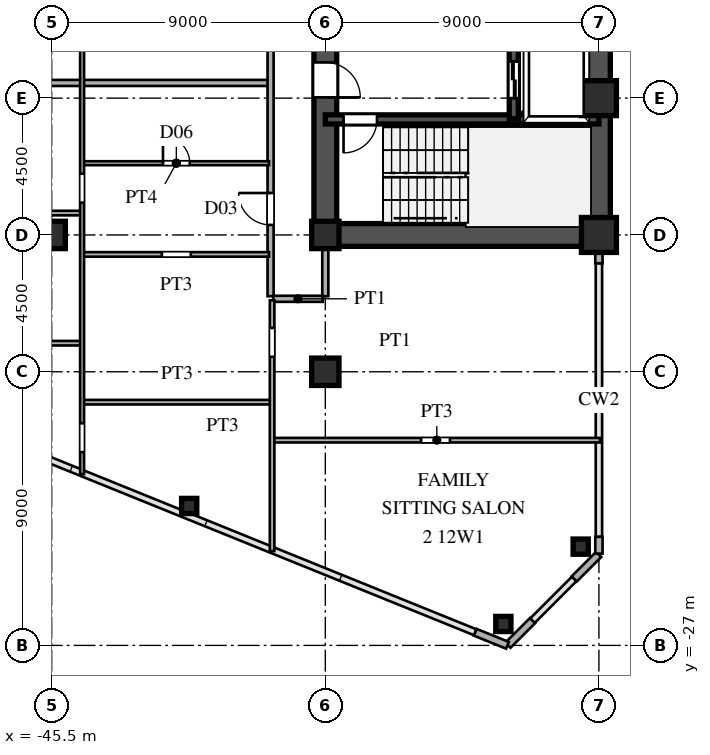
"""IFC4 building model, lengths in metres.
Left out: names, types, materials, properties, quantities, classifications, styles, units other than length and angle.
Written with IfcOpenShell. Run it as: python <this file> out.ifc"""

import sys

from ifc_helpers import new_model, si_unit, direction, frame, frame_2d, origin, origin_2d, place, context, subcontext, project, spatial, rectangle, hollow_rectangle, i_section, extrude, source, transform, mapped, element, fill, save


model = new_model("IFC4")
c1 = context("Model", 3, precision=1e-05, world=origin(), true_north=direction((0.0, 1.0)))
c2 = subcontext(c1, "Body", "Model", "MODEL_VIEW")
j1 = project(units=[si_unit("LENGTHUNIT", "METRE"), si_unit("PLANEANGLEUNIT", "RADIAN")], contexts=[c1])
p1 = place(None, origin())
s1 = spatial("IfcSite", under=j1, at=p1, CompositionType="ELEMENT")
p2 = place(p1, origin())
s2 = spatial("IfcBuilding", under=s1, at=p2, CompositionType="ELEMENT")
p3 = place(p2, frame((0.0, 0.0, 47.7)))
s3 = spatial("IfcBuildingStorey", under=s2, at=p3, CompositionType="ELEMENT", Elevation=47.7)
m1 = source(origin(), c2, "Body", "SweptSolid", [
    extrude(hollow_rectangle(XDim=1.15, YDim=1.15, WallThickness=0.048, at=origin_2d()), origin(), (0.0, 0.0, 1.0), 3.6),
])
for number, where, z_axis, x_axis in (
    (1, (-27.5, -13.5, 0.0), (0.0, 0.0, 1.0), (1.0, 0.0, 0.0)),
    (2, (-27.5, -9.0, 0.0), (0.0, 0.0, 1.0), (1.0, 0.0, 0.0)),
):
    element("IfcColumn", number, at=place(p3, frame(where, z_axis=z_axis, x_axis=x_axis)), inside=s3, PredefinedType="COLUMN", context=c2, shape_type="MappedRepresentation", body=[
        mapped(m1, transform((0.0, 0.0, 0.0), scale=1.0)),
    ])
m2 = source(origin(), c2, "Body", "SweptSolid", [
    extrude(i_section(OverallWidth=0.9, OverallDepth=0.9, WebThickness=0.036, FlangeThickness=0.055, at=origin_2d()), origin(), (0.0, 0.0, 1.0), 3.6),
])
for number, where, z_axis, x_axis in (
    (3, (-36.5, -18.0, 0.0), (0.0, 0.0, 1.0), (1.0, 0.0, 0.0)),
    (4, (-36.5, -13.5, 0.0), (0.0, 0.0, 1.0), (1.0, 0.0, 0.0)),
    (5, (-45.5, -13.5, 0.0), (0.0, 0.0, 1.0), (1.0, 0.0, 0.0)),
):
    element("IfcColumn", number, at=place(p3, frame(where, z_axis=z_axis, x_axis=x_axis)), inside=s3, PredefinedType="COLUMN", context=c2, shape_type="MappedRepresentation", body=[
        mapped(m2, transform((0.0, 0.0, 0.0), scale=1.0)),
    ])
m3 = source(origin(), c2, "Body", "SweptSolid", [
    extrude(hollow_rectangle(XDim=0.5, YDim=0.5, WallThickness=0.02, at=origin_2d()), origin(), (0.0, 0.0, 1.0), 3.6),
])
for number, where, z_axis, x_axis in (
    (6, (-28.1, -23.751, 0.0), (0.0, 0.0, 1.0), (1.0, 0.0, 0.0)),
    (7, (-30.643, -26.295, 0.0), (0.0, 0.0, 1.0), (1.0, 0.0, 0.0)),
    (8, (-40.977, -22.414, 0.0), (0.0, 0.0, 1.0), (1.0, 0.0, 0.0)),
):
    element("IfcColumn", number, at=place(p3, frame(where, z_axis=z_axis, x_axis=x_axis)), inside=s3, PredefinedType="COLUMN", context=c2, shape_type="MappedRepresentation", body=[
        mapped(m3, transform((0.0, 0.0, 0.0), scale=1.0)),
    ])
p4 = place(p3, frame((-27.5, -23.98, 0.0), z_axis=(0.0, 0.0, 1.0), x_axis=(0.0, 1.0, 0.0)))
e9 = element("IfcWall", 9, at=p4, inside=s3, PredefinedType="SOLIDWALL", context=c2, shape_type="SweptSolid", body=[
    extrude(rectangle(XDim=0.55, YDim=0.24, at=frame_2d((0.275, 0.0))), origin(), (0.0, 0.0, 1.0), 3.38),
])
p5 = place(p3, frame((-27.5, -14.43, 0.0), z_axis=(0.0, 0.0, 1.0), x_axis=(0.0, 1.0, 0.0)))
e10 = element("IfcWall", 10, at=p5, inside=s3, PredefinedType="SOLIDWALL", context=c2, shape_type="SweptSolid", body=[
    extrude(rectangle(XDim=0.55, YDim=0.24, at=frame_2d((0.275, 0.0))), origin(), (0.0, 0.0, 1.0), 2.88),
])
p6 = place(p3, frame((-31.566, -26.569, 0.0), z_axis=(0.0, 0.0, 1.0), x_axis=(0.927007103665, -0.375043770452, 0.0)))
e11 = element("IfcWall", 11, at=p6, inside=s3, PredefinedType="SOLIDWALL", context=c2, shape_type="SweptSolid", body=[
    extrude(rectangle(XDim=1.14, YDim=0.24, at=frame_2d((0.57, 0.0))), origin(), (0.0, 0.0, 1.0), 3.38),
])
for number, where, z_axis, x_axis in (
    (12, (-30.493, -26.993, 0.0), (0.0, 0.0, 1.0), (0.707, 0.707, 0.0)),
    (13, (-28.313, -24.813, 0.0), (0.0, 0.0, 1.0), (0.707, 0.707, 0.0)),
):
    element("IfcWall", number, at=place(p3, frame(where, z_axis=z_axis, x_axis=x_axis)), inside=s3, PredefinedType="SOLIDWALL", context=c2, shape_type="SweptSolid", body=[
        extrude(rectangle(XDim=1.14, YDim=0.24, at=frame_2d((0.57, 0.0))), origin(), (0.0, 0.0, 1.0), 3.38),
    ])
p7 = place(p3, frame((-27.5, -13.5, 0.0), z_axis=(0.0, 0.0, 1.0), x_axis=(0.0, 1.0, 0.0)))
e14 = element("IfcWall", 14, at=p7, inside=s3, PredefinedType="SHEAR", context=c2, shape_type="SweptSolid", body=[
    extrude(rectangle(XDim=12.2, YDim=0.75, at=frame_2d((6.1, 0.0))), origin(), (0.0, 0.0, 1.0), 3.38),
])
p8 = place(p3, frame((-36.5, -13.5, 0.0), z_axis=(0.0, 0.0, 1.0), x_axis=(1.0, 0.0, 0.0)))
e15 = element("IfcWall", 15, at=p8, inside=s3, PredefinedType="SHEAR", context=c2, shape_type="SweptSolid", body=[
    extrude(rectangle(XDim=9.0, YDim=0.75, at=frame_2d((4.5, 0.0))), origin(), (0.0, 0.0, 1.0), 3.38),
])
p9 = place(p3, frame((-36.5, -13.65, 0.0), z_axis=(0.0, 0.0, 1.0), x_axis=(0.0, 1.0, 0.0)))
e16 = element("IfcWall", 16, at=p9, inside=s3, PredefinedType="SHEAR", context=c2, shape_type="SweptSolid", body=[
    extrude(rectangle(XDim=7.15, YDim=0.75, at=frame_2d((3.575, 0.0))), origin(), (0.0, 0.0, 1.0), 3.38),
])
p10 = place(p9, frame((4.675, 0.0, 0.0)))
e17 = element("IfcOpeningElement", 17, at=p10, cuts=e16, PredefinedType="OPENING", context=c2, shape_type="SweptSolid", body=[
    extrude(rectangle(XDim=1.15, YDim=2.2, at=frame_2d((0.575, 1.1))), frame((0.0, 0.385, 0.0), z_axis=(0.0, -1.0, 0.0), x_axis=(1.0, 0.0, 0.0)), (0.0, 0.0, 1.0), 0.77),
])
p11 = place(p3, frame((-36.5, -9.7, 0.0), z_axis=(0.0, 0.0, 1.0), x_axis=(1.0, 0.0, 0.0)))
e18 = element("IfcWall", 18, at=p11, inside=s3, PredefinedType="SHEAR", context=c2, shape_type="SweptSolid", body=[
    extrude(rectangle(XDim=9.0, YDim=0.3, at=frame_2d((4.5, 0.0))), origin(), (0.0, 0.0, 1.0), 3.38),
])
p12 = place(p11, frame((0.6, 0.0, 0.0)))
e19 = element("IfcOpeningElement", 19, at=p12, cuts=e18, PredefinedType="OPENING", context=c2, shape_type="SweptSolid", body=[
    extrude(rectangle(XDim=1.1, YDim=2.2, at=frame_2d((0.55, 1.1))), frame((0.0, 0.16, 0.0), z_axis=(0.0, -1.0, 0.0), x_axis=(1.0, 0.0, 0.0)), (0.0, 0.0, 1.0), 0.32),
])
p13 = place(p3, frame((-30.3, -9.68, 0.0), z_axis=(0.0, 0.0, 1.0), x_axis=(0.0, 1.0, 0.0)))
e20 = element("IfcWall", 20, at=p13, inside=s3, PredefinedType="SHEAR", context=c2, shape_type="SweptSolid", body=[
    extrude(rectangle(XDim=2.56, YDim=0.3, at=frame_2d((1.28, 0.0))), origin(), (0.0, 0.0, 1.0), 3.38),
])
p14 = place(p13, frame((0.68, 0.0, 0.0)))
e21 = element("IfcOpeningElement", 21, at=p14, cuts=e20, PredefinedType="OPENING", context=c2, shape_type="SweptSolid", body=[
    extrude(rectangle(XDim=1.2, YDim=2.25, at=frame_2d((0.6, 1.125))), frame((0.0, 0.16, 0.0), z_axis=(0.0, -1.0, 0.0), x_axis=(1.0, 0.0, 0.0)), (0.0, 0.0, 1.0), 0.32),
])
p15 = place(p3, frame((-38.2, -20.25, 0.0), z_axis=(0.0, 0.0, 1.0), x_axis=(1.0, 0.0, 0.0)))
e22 = element("IfcWall", 22, at=p15, inside=s3, PredefinedType="PARTITIONING", context=c2, shape_type="SweptSolid", body=[
    extrude(rectangle(XDim=10.735, YDim=0.15, at=frame_2d((5.367, 0.0))), origin(), (0.0, 0.0, 1.0), 3.38),
])
p16 = place(p15, frame((4.85, 0.0, 0.0)))
e23 = element("IfcOpeningElement", 23, at=p16, cuts=e22, PredefinedType="OPENING", context=c2, shape_type="SweptSolid", body=[
    extrude(rectangle(XDim=0.95, YDim=2.15, at=frame_2d((0.475, 1.075))), frame((0.0, 0.085, 0.0), z_axis=(0.0, -1.0, 0.0), x_axis=(1.0, 0.0, 0.0)), (0.0, 0.0, 1.0), 0.17),
])
p17 = place(p3, frame((-44.45, -19.0, 0.0), z_axis=(0.0, 0.0, 1.0), x_axis=(1.0, 0.0, 0.0)))
e24 = element("IfcWall", 24, at=p17, inside=s3, PredefinedType="PARTITIONING", context=c2, shape_type="SweptSolid", body=[
    extrude(rectangle(XDim=6.15, YDim=0.15, at=frame_2d((3.075, 0.0))), origin(), (0.0, 0.0, 1.0), 3.38),
])
p18 = place(p3, frame((-54.45, -17.06, 0.0), z_axis=(0.0, 0.0, 1.0), x_axis=(1.0, 0.0, 0.0)))
e25 = element("IfcWall", 25, at=p18, inside=s3, PredefinedType="PARTITIONING", context=c2, shape_type="SweptSolid", body=[
    extrude(rectangle(XDim=9.9, YDim=0.15, at=frame_2d((4.95, 0.0))), origin(), (0.0, 0.0, 1.0), 3.38),
])
p19 = place(p18, frame((4.475, 0.0, 0.0)))
e26 = element("IfcOpeningElement", 26, at=p19, cuts=e25, PredefinedType="OPENING", context=c2, shape_type="SweptSolid", body=[
    extrude(rectangle(XDim=0.95, YDim=2.15, at=frame_2d((0.475, 1.075))), frame((0.0, 0.085, 0.0), z_axis=(0.0, -1.0, 0.0), x_axis=(1.0, 0.0, 0.0)), (0.0, 0.0, 1.0), 0.17),
])
p20 = place(p3, frame((-38.215, -15.6, 0.0), z_axis=(0.0, 0.0, 1.0), x_axis=(1.0, 0.0, 0.0)))
e27 = element("IfcWall", 27, at=p20, inside=s3, PredefinedType="PARTITIONING", context=c2, shape_type="SweptSolid", body=[
    extrude(rectangle(XDim=1.63, YDim=0.2, at=frame_2d((0.815, 0.0))), origin(), (0.0, 0.0, 1.0), 3.38),
])
p21 = place(p3, frame((-44.45, -14.14, 0.0), z_axis=(0.0, 0.0, 1.0), x_axis=(1.0, 0.0, 0.0)))
e28 = element("IfcWall", 28, at=p21, inside=s3, PredefinedType="PARTITIONING", context=c2, shape_type="SweptSolid", body=[
    extrude(rectangle(XDim=6.1, YDim=0.15, at=frame_2d((3.05, 0.0))), origin(), (0.0, 0.0, 1.0), 3.38),
])
p22 = place(p21, frame((2.575, 0.0, 0.0)))
e29 = element("IfcOpeningElement", 29, at=p22, cuts=e28, PredefinedType="OPENING", context=c2, shape_type="SweptSolid", body=[
    extrude(rectangle(XDim=0.95, YDim=2.15, at=frame_2d((0.475, 1.075))), frame((0.0, 0.085, 0.0), z_axis=(0.0, -1.0, 0.0), x_axis=(1.0, 0.0, 0.0)), (0.0, 0.0, 1.0), 0.17),
])
p23 = place(p3, frame((-65.672, -12.78, 0.0), z_axis=(0.0, 0.0, 1.0), x_axis=(1.0, 0.0, 0.0)))
e30 = element("IfcWall", 30, at=p23, inside=s3, PredefinedType="PARTITIONING", context=c2, shape_type="SweptSolid", body=[
    extrude(rectangle(XDim=21.122, YDim=0.15, at=frame_2d((10.561, 0.0))), origin(), (0.0, 0.0, 1.0), 3.38),
])
p24 = place(p23, frame((15.697, 0.0, 0.0)))
e31 = element("IfcOpeningElement", 31, at=p24, cuts=e30, PredefinedType="OPENING", context=c2, shape_type="SweptSolid", body=[
    extrude(rectangle(XDim=0.95, YDim=2.15, at=frame_2d((0.475, 1.075))), frame((0.0, 0.085, 0.0), z_axis=(0.0, -1.0, 0.0), x_axis=(1.0, 0.0, 0.0)), (0.0, 0.0, 1.0), 0.17),
])
p25 = place(p23, frame((7.847, 0.0, 0.0)))
e32 = element("IfcOpeningElement", 32, at=p25, cuts=e30, PredefinedType="OPENING", context=c2, shape_type="SweptSolid", body=[
    extrude(rectangle(XDim=0.95, YDim=2.15, at=frame_2d((0.475, 1.075))), frame((0.0, 0.085, 0.0), z_axis=(0.0, -1.0, 0.0), x_axis=(1.0, 0.0, 0.0)), (0.0, 0.0, 1.0), 0.17),
])
p26 = place(p3, frame((-44.45, -11.14, 0.0), z_axis=(0.0, 0.0, 1.0), x_axis=(1.0, 0.0, 0.0)))
e33 = element("IfcWall", 33, at=p26, inside=s3, PredefinedType="PARTITIONING", context=c2, shape_type="SweptSolid", body=[
    extrude(rectangle(XDim=6.1, YDim=0.13, at=frame_2d((3.05, 0.0))), origin(), (0.0, 0.0, 1.0), 3.38),
])
p27 = place(p26, frame((2.61, 0.0, 0.0)))
e34 = element("IfcOpeningElement", 34, at=p27, cuts=e33, PredefinedType="OPENING", context=c2, shape_type="SweptSolid", body=[
    extrude(rectangle(XDim=0.88, YDim=2.1, at=frame_2d((0.44, 1.05))), frame((0.0, 0.075, 0.0), z_axis=(0.0, -1.0, 0.0), x_axis=(1.0, 0.0, 0.0)), (0.0, 0.0, 1.0), 0.15),
])
p28 = place(p3, frame((-72.505, -8.5, 0.0), z_axis=(0.0, 0.0, 1.0), x_axis=(1.0, 0.0, 0.0)))
e35 = element("IfcWall", 35, at=p28, inside=s3, PredefinedType="PARTITIONING", context=c2, shape_type="SweptSolid", body=[
    extrude(rectangle(XDim=34.125, YDim=0.2, at=frame_2d((17.062, 0.0))), origin(), (0.0, 0.0, 1.0), 3.38),
])
p29 = place(p3, frame((-44.5, -21.368, 0.0), z_axis=(0.0, 0.0, 1.0), x_axis=(0.0, 1.0, 0.0)))
e36 = element("IfcWall", 36, at=p29, inside=s3, PredefinedType="PARTITIONING", context=c2, shape_type="SweptSolid", body=[
    extrude(rectangle(XDim=22.151, YDim=0.13, at=frame_2d((11.075, 0.0))), origin(), (0.0, 0.0, 1.0), 3.38),
])
p30 = place(p29, frame((8.932, 0.0, 0.0)))
e37 = element("IfcOpeningElement", 37, at=p30, cuts=e36, PredefinedType="OPENING", context=c2, shape_type="SweptSolid", body=[
    extrude(rectangle(XDim=0.95, YDim=2.15, at=frame_2d((0.475, 1.075))), frame((0.0, 0.075, 0.0), z_axis=(0.0, -1.0, 0.0), x_axis=(1.0, 0.0, 0.0)), (0.0, 0.0, 1.0), 0.15),
])
p31 = place(p29, frame((0.724, 0.0, 0.0)))
e38 = element("IfcOpeningElement", 38, at=p31, cuts=e36, PredefinedType="OPENING", context=c2, shape_type="SweptSolid", body=[
    extrude(rectangle(XDim=0.95, YDim=2.15, at=frame_2d((0.475, 1.075))), frame((0.0, 0.075, 0.0), z_axis=(0.0, -1.0, 0.0), x_axis=(1.0, 0.0, 0.0)), (0.0, 0.0, 1.0), 0.15),
])
p32 = place(p29, frame((19.393, 0.0, 0.0)))
e39 = element("IfcOpeningElement", 39, at=p32, cuts=e36, PredefinedType="OPENING", context=c2, shape_type="SweptSolid", body=[
    extrude(rectangle(XDim=0.95, YDim=2.15, at=frame_2d((0.475, 1.075))), frame((0.0, 0.075, 0.0), z_axis=(0.0, -1.0, 0.0), x_axis=(1.0, 0.0, 0.0)), (0.0, 0.0, 1.0), 0.15),
])
p33 = place(p3, frame((-38.3, -15.515, 0.0), z_axis=(0.0, 0.0, 1.0), x_axis=(0.0, 1.0, 0.0)))
e40 = element("IfcWall", 40, at=p33, inside=s3, PredefinedType="PARTITIONING", context=c2, shape_type="SweptSolid", body=[
    extrude(rectangle(XDim=31.03, YDim=0.2, at=frame_2d((15.515, 0.0))), origin(), (0.0, 0.0, 1.0), 3.38),
])
p34 = place(p33, frame((2.345, 0.0, 0.0)))
e41 = element("IfcOpeningElement", 41, at=p34, cuts=e40, PredefinedType="OPENING", context=c2, shape_type="SweptSolid", body=[
    extrude(rectangle(XDim=1.05, YDim=2.25, at=frame_2d((0.525, 1.125))), frame((0.0, 0.11, 0.0), z_axis=(0.0, -1.0, 0.0), x_axis=(1.0, 0.0, 0.0)), (0.0, 0.0, 1.0), 0.22),
])
p35 = place(p33, frame((13.28, 0.0, 0.0)))
e42 = element("IfcOpeningElement", 42, at=p35, cuts=e40, PredefinedType="OPENING", context=c2, shape_type="SweptSolid", body=[
    extrude(rectangle(XDim=1.05, YDim=2.25, at=frame_2d((0.525, 1.125))), frame((0.0, 0.11, 0.0), z_axis=(0.0, -1.0, 0.0), x_axis=(1.0, 0.0, 0.0)), (0.0, 0.0, 1.0), 0.22),
])
p36 = place(p33, frame((25.567, 0.0, 0.0)))
e43 = element("IfcOpeningElement", 43, at=p36, cuts=e40, PredefinedType="OPENING", context=c2, shape_type="SweptSolid", body=[
    extrude(rectangle(XDim=1.05, YDim=2.25, at=frame_2d((0.525, 1.125))), frame((0.0, 0.11, 0.0), z_axis=(0.0, -1.0, 0.0), x_axis=(1.0, 0.0, 0.0)), (0.0, 0.0, 1.0), 0.22),
])
p37 = place(p3, frame((-38.25, -23.898, 0.0), z_axis=(0.0, 0.0, 1.0), x_axis=(0.0, 1.0, 0.0)))
e44 = element("IfcWall", 44, at=p37, inside=s3, PredefinedType="PARTITIONING", context=c2, shape_type="SweptSolid", body=[
    extrude(rectangle(XDim=8.248, YDim=0.15, at=frame_2d((4.124, 0.0))), origin(), (0.0, 0.0, 1.0), 3.38),
])
p38 = place(p37, frame((6.391, 0.0, 0.0)))
e45 = element("IfcOpeningElement", 45, at=p38, cuts=e44, PredefinedType="OPENING", context=c2, shape_type="SweptSolid", body=[
    extrude(rectangle(XDim=0.95, YDim=2.15, at=frame_2d((0.475, 1.075))), frame((0.0, 0.085, 0.0), z_axis=(0.0, -1.0, 0.0), x_axis=(1.0, 0.0, 0.0)), (0.0, 0.0, 1.0), 0.17),
])
p39 = place(p3, frame((-36.5, -15.515, 0.0), z_axis=(0.0, 0.0, 1.0), x_axis=(0.0, 1.0, 0.0)))
e46 = element("IfcWall", 46, at=p39, inside=s3, PredefinedType="PARTITIONING", context=c2, shape_type="SweptSolid", body=[
    extrude(rectangle(XDim=1.635, YDim=0.2, at=frame_2d((0.817, 0.0))), origin(), (0.0, 0.0, 1.0), 2.68),
])
m4 = source(origin(), c2, "Body", "SweptSolid", [
    extrude(rectangle(XDim=1.15, YDim=2.2, at=frame_2d((0.575, 1.1))), frame((0.0, 0.025, 0.0), z_axis=(0.0, -1.0, 0.0), x_axis=(1.0, 0.0, 0.0)), (0.0, 0.0, 1.0), 0.05),
])
p40 = place(p10, frame((1.15, 0.0, 0.0), z_axis=(0.0, 0.0, 1.0), x_axis=(-1.0, 0.0, 0.0)))
e47 = element("IfcDoor", 47, at=p40, inside=s3, OperationType="SINGLE_SWING_LEFT", PredefinedType="DOOR", context=c2, shape_type="MappedRepresentation", body=[
    mapped(m4, transform((0.0, 0.0, 0.0), scale=1.0)),
])
fill(e17, e47)
m5 = source(origin(), c2, "Body", "SweptSolid", [
    extrude(rectangle(XDim=1.1, YDim=2.2, at=frame_2d((0.55, 1.1))), frame((0.0, 0.025, 0.0), z_axis=(0.0, -1.0, 0.0), x_axis=(1.0, 0.0, 0.0)), (0.0, 0.0, 1.0), 0.05),
])
p41 = place(p12, frame((1.1, 0.0, 0.0), z_axis=(0.0, 0.0, 1.0), x_axis=(-1.0, 0.0, 0.0)))
e48 = element("IfcDoor", 48, at=p41, inside=s3, OperationType="SINGLE_SWING_LEFT", PredefinedType="DOOR", context=c2, shape_type="MappedRepresentation", body=[
    mapped(m5, transform((0.0, 0.0, 0.0), scale=1.0)),
])
fill(e19, e48)
m6 = source(origin(), c2, "Body", "SweptSolid", [
    extrude(rectangle(XDim=1.2, YDim=2.25, at=frame_2d((0.6, 1.125))), frame((0.0, 0.025, 0.0), z_axis=(0.0, -1.0, 0.0), x_axis=(1.0, 0.0, 0.0)), (0.0, 0.0, 1.0), 0.05),
])
p42 = place(p14, origin())
e49 = element("IfcDoor", 49, at=p42, inside=s3, OperationType="DOUBLE_DOOR_SLIDING", PredefinedType="DOOR", context=c2, shape_type="MappedRepresentation", body=[
    mapped(m6, transform((0.0, 0.0, 0.0), scale=1.0)),
])
fill(e21, e49)
m7 = source(origin(), c2, "Body", "SweptSolid", [
    extrude(rectangle(XDim=0.88, YDim=2.1, at=frame_2d((0.44, 1.05))), frame((0.0, 0.025, 0.0), z_axis=(0.0, -1.0, 0.0), x_axis=(1.0, 0.0, 0.0)), (0.0, 0.0, 1.0), 0.05),
])
p43 = place(p27, origin())
e50 = element("IfcDoor", 50, at=p43, inside=s3, OperationType="SINGLE_SWING_LEFT", PredefinedType="DOOR", context=c2, shape_type="MappedRepresentation", body=[
    mapped(m7, transform((0.0, 0.0, 0.0), scale=1.0)),
])
fill(e34, e50)
m8 = source(origin(), c2, "Body", "SweptSolid", [
    extrude(rectangle(XDim=1.05, YDim=2.25, at=frame_2d((0.525, 1.125))), frame((0.0, 0.025, 0.0), z_axis=(0.0, -1.0, 0.0), x_axis=(1.0, 0.0, 0.0)), (0.0, 0.0, 1.0), 0.05),
])
p44 = place(p34, origin())
e51 = element("IfcDoor", 51, at=p44, inside=s3, OperationType="SINGLE_SWING_RIGHT", PredefinedType="DOOR", context=c2, shape_type="MappedRepresentation", body=[
    mapped(m8, transform((0.0, 0.0, 0.0), scale=1.0)),
])
fill(e41, e51)
save(model, sys.argv[1])
